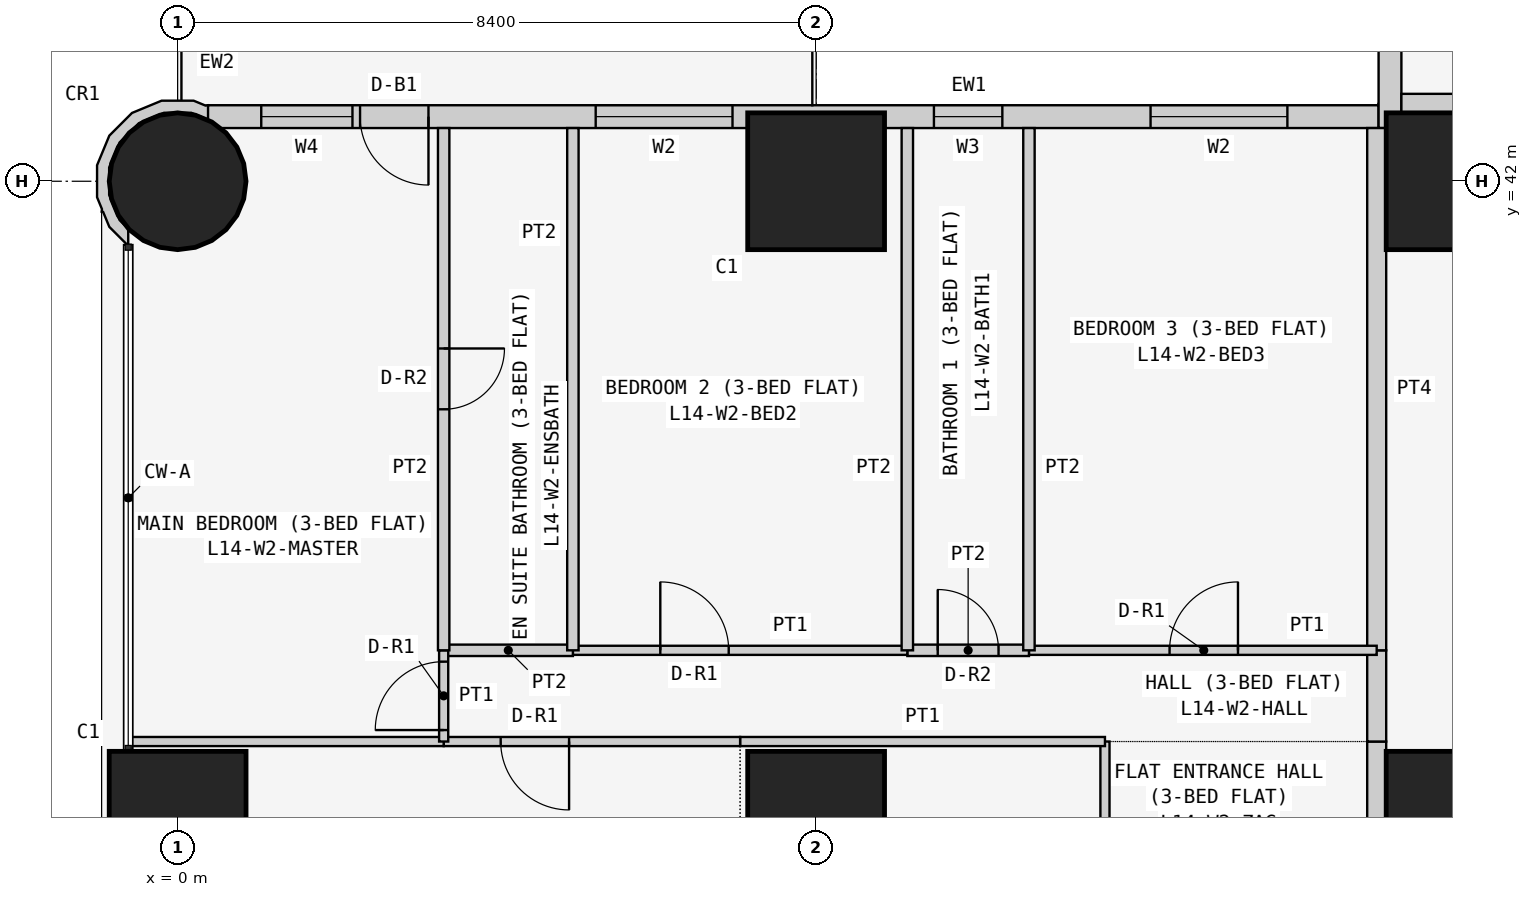
"""IFC4 building model, lengths in metres.
Left out: names, types, materials, properties, quantities, classifications, styles, units other than length and angle.
Written with IfcOpenShell. Run it as: python <this file> out.ifc"""

import sys

from ifc_helpers import new_model, si_unit, direction, frame, frame_2d, origin, origin_2d, place, context, subcontext, project, spatial, polyline, rectangle, circle, outline, extrude, element, fill, save


model = new_model("IFC4")
c1 = context("Model", 3, precision=1e-05, world=origin(), true_north=direction((0.0, 1.0)))
c2 = subcontext(c1, "Body", "Model", "MODEL_VIEW")
j1 = project(units=[si_unit("LENGTHUNIT", "METRE"), si_unit("PLANEANGLEUNIT", "RADIAN")], contexts=[c1])
p1 = place(None, origin())
s1 = spatial("IfcSite", under=j1, at=p1, CompositionType="ELEMENT")
p2 = place(p1, origin())
s2 = spatial("IfcBuilding", under=s1, at=p2, CompositionType="ELEMENT")
p3 = place(p2, frame((0.0, 0.0, 59.7)))
s3 = spatial("IfcBuildingStorey", under=s2, at=p3, CompositionType="ELEMENT", Elevation=59.7)
p4 = place(p3, frame((0.0, 33.6, 0.0), z_axis=(0.0, 0.0, 1.0), x_axis=(1.0, 0.0, 0.0)))
e1 = element("IfcColumn", 1, at=p4, inside=s3, PredefinedType="COLUMN", context=c2, shape_type="SweptSolid", body=[
    extrude(rectangle(XDim=1.8, YDim=1.8, at=origin_2d()), origin(), (0.0, 0.0, 1.0), 3.6),
])
p5 = place(p3, frame((0.0, 42.0, 0.0), z_axis=(0.0, 0.0, 1.0), x_axis=(1.0, 0.0, 0.0)))
e2 = element("IfcColumn", 2, at=p5, inside=s3, PredefinedType="COLUMN", context=c2, shape_type="SweptSolid", body=[
    extrude(circle(Radius=0.9, at=origin_2d()), origin(), (0.0, 0.0, 1.0), 3.6),
])
for number, where, z_axis, x_axis in (
    (3, (8.4, 33.6, 0.0), (0.0, 0.0, 1.0), (1.0, 0.0, 0.0)),
    (4, (8.4, 42.0, 0.0), (0.0, 0.0, 1.0), (1.0, 0.0, 0.0)),
    (5, (16.8, 33.6, 0.0), (0.0, 0.0, 1.0), (1.0, 0.0, 0.0)),
    (6, (16.8, 42.0, 0.0), (0.0, 0.0, 1.0), (1.0, 0.0, 0.0)),
):
    element("IfcColumn", number, at=place(p3, frame(where, z_axis=z_axis, x_axis=x_axis)), inside=s3, PredefinedType="COLUMN", context=c2, shape_type="SweptSolid", body=[
        extrude(rectangle(XDim=1.8, YDim=1.8, at=origin_2d()), origin(), (0.0, 0.0, 1.0), 3.6),
    ])
p6 = place(p3, frame((15.8, 42.85, 0.0), z_axis=(0.0, 0.0, 1.0), x_axis=(-1.0, 0.0, 0.0)))
e7 = element("IfcWall", 7, at=p6, inside=s3, PredefinedType="SOLIDWALL", context=c2, shape_type="SweptSolid", body=[
    extrude(rectangle(XDim=15.4, YDim=0.3, at=frame_2d((7.7, 0.0))), origin(), (0.0, 0.0, 1.0), 3.45),
])
p7 = place(p6, frame((1.2, 0.0, 0.9)))
e8 = element("IfcOpeningElement", 8, at=p7, cuts=e7, PredefinedType="OPENING", context=c2, shape_type="SweptSolid", body=[
    extrude(rectangle(XDim=1.8, YDim=1.5, at=frame_2d((0.9, 0.75))), frame((0.0, 0.16, 0.0), z_axis=(0.0, -1.0, 0.0), x_axis=(1.0, 0.0, 0.0)), (0.0, 0.0, 1.0), 0.32),
])
p8 = place(p6, frame((4.95, 0.0, 1.5)))
e9 = element("IfcOpeningElement", 9, at=p8, cuts=e7, PredefinedType="OPENING", context=c2, shape_type="SweptSolid", body=[
    extrude(rectangle(XDim=0.9, YDim=0.7, at=frame_2d((0.45, 0.35))), frame((0.0, 0.16, 0.0), z_axis=(0.0, -1.0, 0.0), x_axis=(1.0, 0.0, 0.0)), (0.0, 0.0, 1.0), 0.32),
])
p9 = place(p6, frame((8.5, 0.0, 0.9)))
e10 = element("IfcOpeningElement", 10, at=p9, cuts=e7, PredefinedType="OPENING", context=c2, shape_type="SweptSolid", body=[
    extrude(rectangle(XDim=1.8, YDim=1.5, at=frame_2d((0.9, 0.75))), frame((0.0, 0.16, 0.0), z_axis=(0.0, -1.0, 0.0), x_axis=(1.0, 0.0, 0.0)), (0.0, 0.0, 1.0), 0.32),
])
p10 = place(p6, frame((12.5, 0.0, 0.0)))
e11 = element("IfcOpeningElement", 11, at=p10, cuts=e7, PredefinedType="OPENING", context=c2, shape_type="SweptSolid", body=[
    extrude(rectangle(XDim=0.9, YDim=2.4, at=frame_2d((0.45, 1.2))), frame((0.0, 0.16, 0.0), z_axis=(0.0, -1.0, 0.0), x_axis=(1.0, 0.0, 0.0)), (0.0, 0.0, 1.0), 0.32),
])
p11 = place(p6, frame((13.5, 0.0, 0.9)))
e12 = element("IfcOpeningElement", 12, at=p11, cuts=e7, PredefinedType="OPENING", context=c2, shape_type="SweptSolid", body=[
    extrude(rectangle(XDim=1.2, YDim=1.5, at=frame_2d((0.6, 0.75))), frame((0.0, 0.16, 0.0), z_axis=(0.0, -1.0, 0.0), x_axis=(1.0, 0.0, 0.0)), (0.0, 0.0, 1.0), 0.32),
])
p12 = place(p3, frame((15.95, 58.4, 0.0), z_axis=(0.0, 0.0, 1.0), x_axis=(0.0, -1.0, 0.0)))
e13 = element("IfcWall", 13, at=p12, inside=s3, PredefinedType="SOLIDWALL", context=c2, shape_type="SweptSolid", body=[
    extrude(rectangle(XDim=15.7, YDim=0.3, at=frame_2d((7.85, 0.0))), origin(), (0.0, 0.0, 1.0), 3.45),
])
p13 = place(p12, frame((12.4, 0.0, 0.9)))
e14 = element("IfcOpeningElement", 14, at=p13, cuts=e13, PredefinedType="OPENING", context=c2, shape_type="SweptSolid", body=[
    extrude(rectangle(XDim=1.8, YDim=1.5, at=frame_2d((0.9, 0.75))), frame((0.0, 0.16, 0.0), z_axis=(0.0, -1.0, 0.0), x_axis=(1.0, 0.0, 0.0)), (0.0, 0.0, 1.0), 0.32),
])
p14 = place(p12, frame((9.55, 0.0, 1.5)))
e15 = element("IfcOpeningElement", 15, at=p14, cuts=e13, PredefinedType="OPENING", context=c2, shape_type="SweptSolid", body=[
    extrude(rectangle(XDim=0.9, YDim=0.7, at=frame_2d((0.45, 0.35))), frame((0.0, 0.16, 0.0), z_axis=(0.0, -1.0, 0.0), x_axis=(1.0, 0.0, 0.0)), (0.0, 0.0, 1.0), 0.32),
])
p15 = place(p12, frame((5.1, 0.0, 0.9)))
e16 = element("IfcOpeningElement", 16, at=p15, cuts=e13, PredefinedType="OPENING", context=c2, shape_type="SweptSolid", body=[
    extrude(rectangle(XDim=1.8, YDim=1.5, at=frame_2d((0.9, 0.75))), frame((0.0, 0.16, 0.0), z_axis=(0.0, -1.0, 0.0), x_axis=(1.0, 0.0, 0.0)), (0.0, 0.0, 1.0), 0.32),
])
p16 = place(p12, frame((2.0, 0.0, 0.0)))
e17 = element("IfcOpeningElement", 17, at=p16, cuts=e13, PredefinedType="OPENING", context=c2, shape_type="SweptSolid", body=[
    extrude(rectangle(XDim=0.9, YDim=2.4, at=frame_2d((0.45, 1.2))), frame((0.0, 0.16, 0.0), z_axis=(0.0, -1.0, 0.0), x_axis=(1.0, 0.0, 0.0)), (0.0, 0.0, 1.0), 0.32),
])
p17 = place(p12, frame((0.7, 0.0, 0.9)))
e18 = element("IfcOpeningElement", 18, at=p17, cuts=e13, PredefinedType="OPENING", context=c2, shape_type="SweptSolid", body=[
    extrude(rectangle(XDim=1.2, YDim=1.5, at=frame_2d((0.6, 0.75))), frame((0.0, 0.16, 0.0), z_axis=(0.0, -1.0, 0.0), x_axis=(1.0, 0.0, 0.0)), (0.0, 0.0, 1.0), 0.32),
])
p18 = place(p3, frame((0.364, 42.91, 0.0), z_axis=(0.0, 0.0, 1.0), x_axis=(-0.926129809145, 0.377204953059, 0.0)))
e19 = element("IfcWall", 19, at=p18, inside=s3, PredefinedType="SOLIDWALL", context=c2, shape_type="SweptSolid", body=[
    extrude(outline(polyline([(0.36, 1.803), (0.509, 1.741), (0.761, 1.486), (0.896, 1.154), (0.894, 0.795), (0.755, 0.465), (0.5, 0.213), (0.168, 0.078), (-0.1, 0.08), (0.001, -0.097), (0.03, -0.08), (0.199, -0.081), (0.589, 0.078), (0.889, 0.374), (1.053, 0.763), (1.055, 1.185), (0.896, 1.575), (0.778, 1.695), (0.769, 1.728), (0.75, 1.723), (0.6, 1.875), (0.295, 2.003), (0.281, 1.998), (0.36, 1.803)])), origin(), (0.0, 0.0, 1.0), 3.45),
])
p19 = place(p3, frame((16.1, 43.025, 0.0), z_axis=(0.0, 0.0, 1.0), x_axis=(1.0, 0.0, 0.0)))
e20 = element("IfcWall", 20, at=p19, inside=s3, PredefinedType="PARTITIONING", context=c2, shape_type="SweptSolid", body=[
    extrude(rectangle(XDim=6.871, YDim=0.25, at=frame_2d((3.436, 0.0))), origin(), (0.0, 0.0, 1.0), 3.45),
])
p20 = place(p3, frame((15.775, 29.4, 0.0), z_axis=(0.0, 0.0, 1.0), x_axis=(0.0, 1.0, 0.0)))
e21 = element("IfcWall", 21, at=p20, inside=s3, PredefinedType="PARTITIONING", context=c2, shape_type="SweptSolid", body=[
    extrude(rectangle(XDim=5.229, YDim=0.25, at=frame_2d((2.615, 0.0))), origin(), (0.0, 0.0, 1.0), 3.45),
])
p21 = place(p20, frame((2.1, 0.0, 0.0)))
e22 = element("IfcOpeningElement", 22, at=p21, cuts=e21, PredefinedType="OPENING", context=c2, shape_type="SweptSolid", body=[
    extrude(rectangle(XDim=1.0, YDim=2.1, at=frame_2d((0.5, 1.05))), frame((0.0, 0.135, 0.0), z_axis=(0.0, -1.0, 0.0), x_axis=(1.0, 0.0, 0.0)), (0.0, 0.0, 1.0), 0.27),
])
p22 = place(p3, frame((15.775, 34.629, 0.0), z_axis=(0.0, 0.0, 1.0), x_axis=(0.0, 1.0, 0.0)))
e23 = element("IfcWall", 23, at=p22, inside=s3, PredefinedType="PARTITIONING", context=c2, shape_type="SweptSolid", body=[
    extrude(rectangle(XDim=1.2, YDim=0.25, at=frame_2d((0.6, 0.0))), origin(), (0.0, 0.0, 1.0), 3.45),
])
p23 = place(p3, frame((15.775, 35.829, 0.0), z_axis=(0.0, 0.0, 1.0), x_axis=(0.0, 1.0, 0.0)))
e24 = element("IfcWall", 24, at=p23, inside=s3, PredefinedType="PARTITIONING", context=c2, shape_type="SweptSolid", body=[
    extrude(rectangle(XDim=6.871, YDim=0.25, at=frame_2d((3.436, 0.0))), origin(), (0.0, 0.0, 1.0), 3.45),
])
p24 = place(p3, frame((12.2, 29.4, 0.0), z_axis=(0.0, 0.0, 1.0), x_axis=(0.0, 1.0, 0.0)))
e25 = element("IfcWall", 25, at=p24, inside=s3, PredefinedType="PARTITIONING", context=c2, shape_type="SweptSolid", body=[
    extrude(rectangle(XDim=5.229, YDim=0.12, at=frame_2d((2.615, 0.0))), origin(), (0.0, 0.0, 1.0), 3.45),
])
p25 = place(p24, frame((1.05, 0.0, 0.0)))
e26 = element("IfcOpeningElement", 26, at=p25, cuts=e25, PredefinedType="OPENING", context=c2, shape_type="SweptSolid", body=[
    extrude(rectangle(XDim=0.9, YDim=2.1, at=frame_2d((0.45, 1.05))), frame((0.0, 0.07, 0.0), z_axis=(0.0, -1.0, 0.0), x_axis=(1.0, 0.0, 0.0)), (0.0, 0.0, 1.0), 0.14),
])
p26 = place(p3, frame((7.4, 34.629, 0.0), z_axis=(0.0, 0.0, 1.0), x_axis=(1.0, 0.0, 0.0)))
e27 = element("IfcWall", 27, at=p26, inside=s3, PredefinedType="PARTITIONING", context=c2, shape_type="SweptSolid", body=[
    extrude(rectangle(XDim=4.8, YDim=0.12, at=frame_2d((2.4, 0.0))), origin(), (0.0, 0.0, 1.0), 3.45),
])
p27 = place(p3, frame((3.5, 34.629, 0.0), z_axis=(0.0, 0.0, 1.0), x_axis=(1.0, 0.0, 0.0)))
e28 = element("IfcWall", 28, at=p27, inside=s3, PredefinedType="PARTITIONING", context=c2, shape_type="SweptSolid", body=[
    extrude(rectangle(XDim=3.9, YDim=0.12, at=frame_2d((1.95, 0.0))), origin(), (0.0, 0.0, 1.0), 3.45),
])
p28 = place(p27, frame((0.75, 0.0, 0.0)))
e29 = element("IfcOpeningElement", 29, at=p28, cuts=e28, PredefinedType="OPENING", context=c2, shape_type="SweptSolid", body=[
    extrude(rectangle(XDim=0.9, YDim=2.1, at=frame_2d((0.45, 1.05))), frame((0.0, 0.07, 0.0), z_axis=(0.0, -1.0, 0.0), x_axis=(1.0, 0.0, 0.0)), (0.0, 0.0, 1.0), 0.14),
])
p29 = place(p3, frame((-0.65, 34.629, 0.0), z_axis=(0.0, 0.0, 1.0), x_axis=(1.0, 0.0, 0.0)))
e30 = element("IfcWall", 30, at=p29, inside=s3, PredefinedType="PARTITIONING", context=c2, shape_type="SweptSolid", body=[
    extrude(rectangle(XDim=4.15, YDim=0.12, at=frame_2d((2.075, 0.0))), origin(), (0.0, 0.0, 1.0), 3.45),
])
p30 = place(p3, frame((11.2, 35.829, 0.0), z_axis=(0.0, 0.0, 1.0), x_axis=(1.0, 0.0, 0.0)))
e31 = element("IfcWall", 31, at=p30, inside=s3, PredefinedType="PARTITIONING", context=c2, shape_type="SweptSolid", body=[
    extrude(rectangle(XDim=4.575, YDim=0.12, at=frame_2d((2.288, 0.0))), origin(), (0.0, 0.0, 1.0), 3.45),
])
p31 = place(p30, frame((1.85, 0.0, 0.0)))
e32 = element("IfcOpeningElement", 32, at=p31, cuts=e31, PredefinedType="OPENING", context=c2, shape_type="SweptSolid", body=[
    extrude(rectangle(XDim=0.9, YDim=2.1, at=frame_2d((0.45, 1.05))), frame((0.0, 0.07, 0.0), z_axis=(0.0, -1.0, 0.0), x_axis=(1.0, 0.0, 0.0)), (0.0, 0.0, 1.0), 0.14),
])
p32 = place(p3, frame((9.6, 35.829, 0.0), z_axis=(0.0, 0.0, 1.0), x_axis=(1.0, 0.0, 0.0)))
e33 = element("IfcWall", 33, at=p32, inside=s3, PredefinedType="PARTITIONING", context=c2, shape_type="SweptSolid", body=[
    extrude(rectangle(XDim=1.6, YDim=0.15, at=frame_2d((0.8, 0.0))), origin(), (0.0, 0.0, 1.0), 3.45),
])
p33 = place(p32, frame((0.4, 0.0, 0.0)))
e34 = element("IfcOpeningElement", 34, at=p33, cuts=e33, PredefinedType="OPENING", context=c2, shape_type="SweptSolid", body=[
    extrude(rectangle(XDim=0.8, YDim=2.1, at=frame_2d((0.4, 1.05))), frame((0.0, 0.085, 0.0), z_axis=(0.0, -1.0, 0.0), x_axis=(1.0, 0.0, 0.0)), (0.0, 0.0, 1.0), 0.17),
])
p34 = place(p3, frame((5.2, 35.829, 0.0), z_axis=(0.0, 0.0, 1.0), x_axis=(1.0, 0.0, 0.0)))
e35 = element("IfcWall", 35, at=p34, inside=s3, PredefinedType="PARTITIONING", context=c2, shape_type="SweptSolid", body=[
    extrude(rectangle(XDim=4.4, YDim=0.12, at=frame_2d((2.2, 0.0))), origin(), (0.0, 0.0, 1.0), 3.45),
])
p35 = place(p34, frame((1.15, 0.0, 0.0)))
e36 = element("IfcOpeningElement", 36, at=p35, cuts=e35, PredefinedType="OPENING", context=c2, shape_type="SweptSolid", body=[
    extrude(rectangle(XDim=0.9, YDim=2.1, at=frame_2d((0.45, 1.05))), frame((0.0, 0.07, 0.0), z_axis=(0.0, -1.0, 0.0), x_axis=(1.0, 0.0, 0.0)), (0.0, 0.0, 1.0), 0.14),
])
p36 = place(p3, frame((3.5, 35.829, 0.0), z_axis=(0.0, 0.0, 1.0), x_axis=(1.0, 0.0, 0.0)))
e37 = element("IfcWall", 37, at=p36, inside=s3, PredefinedType="PARTITIONING", context=c2, shape_type="SweptSolid", body=[
    extrude(rectangle(XDim=1.7, YDim=0.15, at=frame_2d((0.85, 0.0))), origin(), (0.0, 0.0, 1.0), 3.45),
])
p37 = place(p3, frame((3.5, 34.629, 0.0), z_axis=(0.0, 0.0, 1.0), x_axis=(0.0, 1.0, 0.0)))
e38 = element("IfcWall", 38, at=p37, inside=s3, PredefinedType="PARTITIONING", context=c2, shape_type="SweptSolid", body=[
    extrude(rectangle(XDim=1.2, YDim=0.12, at=frame_2d((0.6, 0.0))), origin(), (0.0, 0.0, 1.0), 3.45),
])
p38 = place(p37, frame((0.151, 0.0, 0.0)))
e39 = element("IfcOpeningElement", 39, at=p38, cuts=e38, PredefinedType="OPENING", context=c2, shape_type="SweptSolid", body=[
    extrude(rectangle(XDim=0.9, YDim=2.1, at=frame_2d((0.45, 1.05))), frame((0.0, 0.07, 0.0), z_axis=(0.0, -1.0, 0.0), x_axis=(1.0, 0.0, 0.0)), (0.0, 0.0, 1.0), 0.14),
])
for number, where, z_axis, x_axis in (
    (40, (11.2, 35.829, 0.0), (0.0, 0.0, 1.0), (0.0, 1.0, 0.0)),
    (41, (9.6, 35.829, 0.0), (0.0, 0.0, 1.0), (0.0, 1.0, 0.0)),
    (42, (5.2, 35.829, 0.0), (0.0, 0.0, 1.0), (0.0, 1.0, 0.0)),
):
    element("IfcWall", number, at=place(p3, frame(where, z_axis=z_axis, x_axis=x_axis)), inside=s3, PredefinedType="PARTITIONING", context=c2, shape_type="SweptSolid", body=[
        extrude(rectangle(XDim=6.871, YDim=0.15, at=frame_2d((3.436, 0.0))), origin(), (0.0, 0.0, 1.0), 3.45),
    ])
p39 = place(p3, frame((3.5, 35.829, 0.0), z_axis=(0.0, 0.0, 1.0), x_axis=(0.0, 1.0, 0.0)))
e43 = element("IfcWall", 43, at=p39, inside=s3, PredefinedType="PARTITIONING", context=c2, shape_type="SweptSolid", body=[
    extrude(rectangle(XDim=6.871, YDim=0.15, at=frame_2d((3.436, 0.0))), origin(), (0.0, 0.0, 1.0), 3.45),
])
p40 = place(p39, frame((3.171, 0.0, 0.0)))
e44 = element("IfcOpeningElement", 44, at=p40, cuts=e43, PredefinedType="OPENING", context=c2, shape_type="SweptSolid", body=[
    extrude(rectangle(XDim=0.8, YDim=2.1, at=frame_2d((0.4, 1.05))), frame((0.0, 0.085, 0.0), z_axis=(0.0, -1.0, 0.0), x_axis=(1.0, 0.0, 0.0)), (0.0, 0.0, 1.0), 0.17),
])
p41 = place(p7, origin())
e45 = element("IfcWindow", 45, at=p41, inside=s3, PartitioningType="SINGLE_PANEL", PredefinedType="WINDOW", context=c2, shape_type="SweptSolid", body=[
    extrude(rectangle(XDim=1.8, YDim=1.5, at=frame_2d((0.9, 0.75))), frame((0.0, 0.03, 0.0), z_axis=(0.0, -1.0, 0.0), x_axis=(1.0, 0.0, 0.0)), (0.0, 0.0, 1.0), 0.06),
])
fill(e8, e45)
p42 = place(p8, origin())
e46 = element("IfcWindow", 46, at=p42, inside=s3, PartitioningType="SINGLE_PANEL", PredefinedType="WINDOW", context=c2, shape_type="SweptSolid", body=[
    extrude(rectangle(XDim=0.9, YDim=0.7, at=frame_2d((0.45, 0.35))), frame((0.0, 0.03, 0.0), z_axis=(0.0, -1.0, 0.0), x_axis=(1.0, 0.0, 0.0)), (0.0, 0.0, 1.0), 0.06),
])
fill(e9, e46)
p43 = place(p9, origin())
e47 = element("IfcWindow", 47, at=p43, inside=s3, PartitioningType="SINGLE_PANEL", PredefinedType="WINDOW", context=c2, shape_type="SweptSolid", body=[
    extrude(rectangle(XDim=1.8, YDim=1.5, at=frame_2d((0.9, 0.75))), frame((0.0, 0.03, 0.0), z_axis=(0.0, -1.0, 0.0), x_axis=(1.0, 0.0, 0.0)), (0.0, 0.0, 1.0), 0.06),
])
fill(e10, e47)
p44 = place(p10, origin())
e48 = element("IfcDoor", 48, at=p44, inside=s3, OperationType="SINGLE_SWING_LEFT", PredefinedType="DOOR", context=c2, shape_type="SweptSolid", body=[
    extrude(rectangle(XDim=0.9, YDim=2.4, at=frame_2d((0.45, 1.2))), frame((0.0, 0.025, 0.0), z_axis=(0.0, -1.0, 0.0), x_axis=(1.0, 0.0, 0.0)), (0.0, 0.0, 1.0), 0.05),
])
fill(e11, e48)
p45 = place(p11, origin())
e49 = element("IfcWindow", 49, at=p45, inside=s3, PartitioningType="SINGLE_PANEL", PredefinedType="WINDOW", context=c2, shape_type="SweptSolid", body=[
    extrude(rectangle(XDim=1.2, YDim=1.5, at=frame_2d((0.6, 0.75))), frame((0.0, 0.03, 0.0), z_axis=(0.0, -1.0, 0.0), x_axis=(1.0, 0.0, 0.0)), (0.0, 0.0, 1.0), 0.06),
])
fill(e12, e49)
p46 = place(p28, frame((0.9, 0.0, 0.0), z_axis=(0.0, 0.0, 1.0), x_axis=(-1.0, 0.0, 0.0)))
e50 = element("IfcDoor", 50, at=p46, inside=s3, OperationType="SINGLE_SWING_LEFT", PredefinedType="DOOR", context=c2, shape_type="SweptSolid", body=[
    extrude(rectangle(XDim=0.9, YDim=2.1, at=frame_2d((0.45, 1.05))), frame((0.0, 0.025, 0.0), z_axis=(0.0, -1.0, 0.0), x_axis=(1.0, 0.0, 0.0)), (0.0, 0.0, 1.0), 0.05),
])
fill(e29, e50)
p47 = place(p31, origin())
e51 = element("IfcDoor", 51, at=p47, inside=s3, OperationType="SINGLE_SWING_RIGHT", PredefinedType="DOOR", context=c2, shape_type="SweptSolid", body=[
    extrude(rectangle(XDim=0.9, YDim=2.1, at=frame_2d((0.45, 1.05))), frame((0.0, 0.025, 0.0), z_axis=(0.0, -1.0, 0.0), x_axis=(1.0, 0.0, 0.0)), (0.0, 0.0, 1.0), 0.05),
])
fill(e32, e51)
p48 = place(p33, origin())
e52 = element("IfcDoor", 52, at=p48, inside=s3, OperationType="SINGLE_SWING_LEFT", PredefinedType="DOOR", context=c2, shape_type="SweptSolid", body=[
    extrude(rectangle(XDim=0.8, YDim=2.1, at=frame_2d((0.4, 1.05))), frame((0.0, 0.025, 0.0), z_axis=(0.0, -1.0, 0.0), x_axis=(1.0, 0.0, 0.0)), (0.0, 0.0, 1.0), 0.05),
])
fill(e34, e52)
p49 = place(p35, origin())
e53 = element("IfcDoor", 53, at=p49, inside=s3, OperationType="SINGLE_SWING_LEFT", PredefinedType="DOOR", context=c2, shape_type="SweptSolid", body=[
    extrude(rectangle(XDim=0.9, YDim=2.1, at=frame_2d((0.45, 1.05))), frame((0.0, 0.025, 0.0), z_axis=(0.0, -1.0, 0.0), x_axis=(1.0, 0.0, 0.0)), (0.0, 0.0, 1.0), 0.05),
])
fill(e36, e53)
p50 = place(p38, origin())
e54 = element("IfcDoor", 54, at=p50, inside=s3, OperationType="SINGLE_SWING_LEFT", PredefinedType="DOOR", context=c2, shape_type="SweptSolid", body=[
    extrude(rectangle(XDim=0.9, YDim=2.1, at=frame_2d((0.45, 1.05))), frame((0.0, 0.025, 0.0), z_axis=(0.0, -1.0, 0.0), x_axis=(1.0, 0.0, 0.0)), (0.0, 0.0, 1.0), 0.05),
])
fill(e39, e54)
p51 = place(p40, frame((0.8, 0.0, 0.0), z_axis=(0.0, 0.0, 1.0), x_axis=(-1.0, 0.0, 0.0)))
e55 = element("IfcDoor", 55, at=p51, inside=s3, OperationType="SINGLE_SWING_LEFT", PredefinedType="DOOR", context=c2, shape_type="SweptSolid", body=[
    extrude(rectangle(XDim=0.8, YDim=2.1, at=frame_2d((0.4, 1.05))), frame((0.0, 0.025, 0.0), z_axis=(0.0, -1.0, 0.0), x_axis=(1.0, 0.0, 0.0)), (0.0, 0.0, 1.0), 0.05),
])
fill(e44, e55)
save(model, sys.argv[1])
